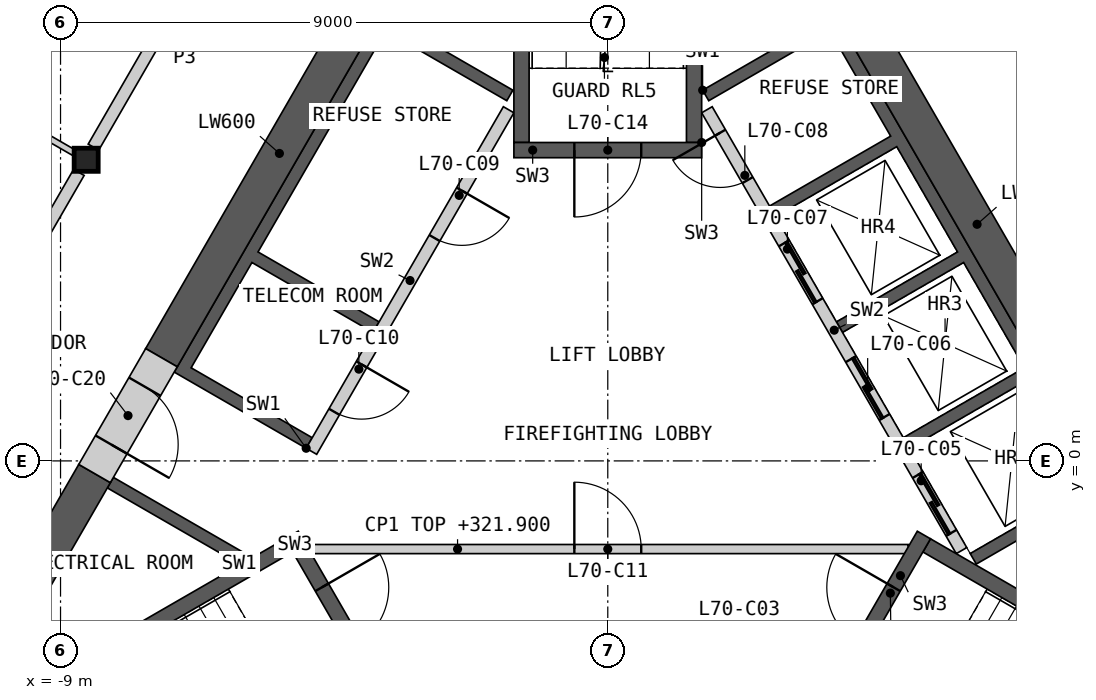
"""IFC4 building model, lengths in metres.
Left out: names, types, materials, properties, quantities, classifications, styles, units other than length and angle.
Written with IfcOpenShell. Run it as: python <this file> out.ifc"""

import sys

from ifc_helpers import new_model, si_unit, direction, frame, frame_2d, origin, origin_2d, place, context, subcontext, project, spatial, polyline, rectangle, i_section, outline, extrude, element, fill, save


model = new_model("IFC4")
c1 = context("Model", 3, precision=1e-05, world=origin(), true_north=direction((0.0, 1.0)))
c2 = subcontext(c1, "Body", "Model", "MODEL_VIEW")
j1 = project(units=[si_unit("LENGTHUNIT", "METRE"), si_unit("PLANEANGLEUNIT", "RADIAN")], contexts=[c1])
p1 = place(None, origin())
s1 = spatial("IfcSite", under=j1, at=p1, CompositionType="ELEMENT")
p2 = place(p1, origin())
s2 = spatial("IfcBuilding", under=s1, at=p2, CompositionType="ELEMENT")
p3 = place(p2, frame((0.0, 0.0, 318.8)))
s3 = spatial("IfcBuildingStorey", under=s2, at=p3, CompositionType="ELEMENT", Elevation=318.8)
p4 = place(p3, frame((-8.578, 4.953, 0.0), z_axis=(0.0, 0.0, 1.0), x_axis=(1.0, 0.0, 0.0)))
e1 = element("IfcColumn", 1, at=p4, inside=s3, PredefinedType="COLUMN", context=c2, shape_type="SweptSolid", body=[
    extrude(i_section(OverallWidth=0.396, OverallDepth=0.381, WebThickness=0.019, FlangeThickness=0.03, at=origin_2d()), origin(), (0.0, 0.0, 1.0), 3.4),
])
p5 = place(p3, origin())
e2 = element("IfcWall", 2, at=p5, inside=s3, PredefinedType="SHEAR", context=c2, shape_type="SweptSolid", body=[
    extrude(outline(polyline([(1.561, 6.097), (3.731, 7.35), (8.231, -0.444), (6.061, -1.697), (5.96, -1.524), (7.952, -0.374), (6.952, 1.358), (4.96, 0.208), (4.861, 0.381), (6.852, 1.531), (5.852, 3.263), (3.861, 2.113), (3.76, 2.287), (5.752, 3.437), (4.752, 5.169), (2.76, 4.019), (2.66, 4.192), (4.652, 5.342), (3.652, 7.074), (1.66, 5.924), (1.561, 6.097)])), origin(), (0.0, 0.0, 1.0), 3.1),
])
p6 = place(p3, frame((5.817, -1.476, 0.0), z_axis=(0.0, 0.0, 1.0), x_axis=(-0.500002616675, 0.866023893041, 0.0)))
e3 = element("IfcWall", 3, at=p6, inside=s3, PredefinedType="SOLIDWALL", context=c2, shape_type="SweptSolid", body=[
    extrude(rectangle(XDim=8.373, YDim=0.2, at=frame_2d((4.187, 0.0))), origin(), (0.0, 0.0, 1.0), 3.1),
])
p7 = place(p6, frame((0.337, 0.0, 0.0)))
e4 = element("IfcOpeningElement", 4, at=p7, cuts=e3, PredefinedType="OPENING", context=c2, shape_type="SweptSolid", body=[
    extrude(rectangle(XDim=1.1, YDim=2.1, at=frame_2d((0.55, 1.05))), frame((0.0, 0.11, 0.0), z_axis=(0.0, -1.0, 0.0), x_axis=(1.0, 0.0, 0.0)), (0.0, 0.0, 1.0), 0.22),
])
p8 = place(p6, frame((2.537, 0.0, 0.0)))
e5 = element("IfcOpeningElement", 5, at=p8, cuts=e3, PredefinedType="OPENING", context=c2, shape_type="SweptSolid", body=[
    extrude(rectangle(XDim=1.1, YDim=2.1, at=frame_2d((0.55, 1.05))), frame((0.0, 0.11, 0.0), z_axis=(0.0, -1.0, 0.0), x_axis=(1.0, 0.0, 0.0)), (0.0, 0.0, 1.0), 0.22),
])
p9 = place(p6, frame((4.737, 0.0, 0.0)))
e6 = element("IfcOpeningElement", 6, at=p9, cuts=e3, PredefinedType="OPENING", context=c2, shape_type="SweptSolid", body=[
    extrude(rectangle(XDim=1.1, YDim=2.1, at=frame_2d((0.55, 1.05))), frame((0.0, 0.11, 0.0), z_axis=(0.0, -1.0, 0.0), x_axis=(1.0, 0.0, 0.0)), (0.0, 0.0, 1.0), 0.22),
])
p10 = place(p6, frame((7.037, 0.0, 0.0)))
e7 = element("IfcOpeningElement", 7, at=p10, cuts=e3, PredefinedType="OPENING", context=c2, shape_type="SweptSolid", body=[
    extrude(rectangle(XDim=0.9, YDim=2.1, at=frame_2d((0.45, 1.05))), frame((0.0, 0.11, 0.0), z_axis=(0.0, -1.0, 0.0), x_axis=(1.0, 0.0, 0.0)), (0.0, 0.0, 1.0), 0.22),
])
p11 = place(p3, origin())
e8 = element("IfcWall", 8, at=p11, inside=s3, PredefinedType="SHEAR", context=c2, shape_type="SweptSolid", body=[
    extrude(outline(polyline([(-6.061, -1.697), (-8.231, -0.444), (-8.131, -0.271), (-5.96, -1.524), (-6.061, -1.697)])), origin(), (0.0, 0.0, 1.0), 3.1),
])
p12 = place(p3, origin())
e9 = element("IfcWall", 9, at=p12, inside=s3, PredefinedType="SHEAR", context=c2, shape_type="SweptSolid", body=[
    extrude(outline(polyline([(-4.96, 0.208), (-7.131, 1.461), (-3.731, 7.35), (-1.561, 6.097), (-1.66, 5.924), (-3.652, 7.074), (-5.752, 3.437), (-3.76, 2.287), (-3.861, 2.113), (-5.852, 3.263), (-6.852, 1.531), (-4.861, 0.381), (-4.96, 0.208)])), origin(), (0.0, 0.0, 1.0), 3.1),
])
p13 = place(p3, frame((-1.631, 5.776, 0.0), z_axis=(0.0, 0.0, 1.0), x_axis=(-0.499992876559, -0.866029516466, 0.0)))
e10 = element("IfcWall", 10, at=p13, inside=s3, PredefinedType="SOLIDWALL", context=c2, shape_type="SweptSolid", body=[
    extrude(rectangle(XDim=6.486, YDim=0.2, at=frame_2d((3.243, 0.0))), origin(), (0.0, 0.0, 1.0), 3.1),
])
p14 = place(p13, frame((1.537, 0.0, 0.0)))
e11 = element("IfcOpeningElement", 11, at=p14, cuts=e10, PredefinedType="OPENING", context=c2, shape_type="SweptSolid", body=[
    extrude(rectangle(XDim=0.9, YDim=2.1, at=frame_2d((0.45, 1.05))), frame((0.0, 0.11, 0.0), z_axis=(0.0, -1.0, 0.0), x_axis=(1.0, 0.0, 0.0)), (0.0, 0.0, 1.0), 0.22),
])
p15 = place(p13, frame((4.837, 0.0, 0.0)))
e12 = element("IfcOpeningElement", 12, at=p15, cuts=e10, PredefinedType="OPENING", context=c2, shape_type="SweptSolid", body=[
    extrude(rectangle(XDim=0.9, YDim=2.1, at=frame_2d((0.45, 1.05))), frame((0.0, 0.11, 0.0), z_axis=(0.0, -1.0, 0.0), x_axis=(1.0, 0.0, 0.0)), (0.0, 0.0, 1.0), 0.22),
])
p16 = place(p3, frame((-4.941, -1.45, 0.0), z_axis=(0.0, 0.0, 1.0), x_axis=(1.0, 0.0, 0.0)))
e13 = element("IfcWall", 13, at=p16, inside=s3, PredefinedType="PARTITIONING", context=c2, shape_type="SweptSolid", body=[
    extrude(rectangle(XDim=9.882, YDim=0.15, at=frame_2d((4.941, 0.0))), origin(), (0.0, 0.0, 1.0), 3.1),
])
p17 = place(p16, frame((4.391, 0.0, 0.0)))
e14 = element("IfcOpeningElement", 14, at=p17, cuts=e13, PredefinedType="OPENING", context=c2, shape_type="SweptSolid", body=[
    extrude(rectangle(XDim=1.1, YDim=2.1, at=frame_2d((0.55, 1.05))), frame((0.0, 0.085, 0.0), z_axis=(0.0, -1.0, 0.0), x_axis=(1.0, 0.0, 0.0)), (0.0, 0.0, 1.0), 0.17),
])
p18 = place(p3, origin())
e15 = element("IfcWall", 15, at=p18, inside=s3, PredefinedType="SHEAR", context=c2, shape_type="SweptSolid", body=[
    extrude(outline(polyline([(-5.307, -1.281), (-10.374, -4.206), (-10.032, -4.298), (-5.182, -1.498), (-5.307, -1.281)])), origin(), (0.0, 0.0, 1.0), 3.1),
])
p19 = place(p3, frame((-5.199, -1.219, 0.0), z_axis=(0.0, 0.0, 1.0), x_axis=(0.499982516597, -0.866035497597, 0.0)))
e16 = element("IfcWall", 16, at=p19, inside=s3, PredefinedType="SHEAR", context=c2, shape_type="SweptSolid", body=[
    extrude(rectangle(XDim=3.088, YDim=0.25, at=frame_2d((1.544, 0.0))), origin(), (0.0, 0.0, 1.0), 3.1),
])
p20 = place(p19, frame((0.994, 0.0, 0.0)))
e17 = element("IfcOpeningElement", 17, at=p20, cuts=e16, PredefinedType="OPENING", context=c2, shape_type="SweptSolid", body=[
    extrude(rectangle(XDim=1.1, YDim=2.1, at=frame_2d((0.55, 1.05))), frame((0.0, 0.135, 0.0), z_axis=(0.0, -1.0, 0.0), x_axis=(1.0, 0.0, 0.0)), (0.0, 0.0, 1.0), 0.27),
])
p21 = place(p3, origin())
e18 = element("IfcWall", 18, at=p21, inside=s3, PredefinedType="SHEAR", context=c2, shape_type="SweptSolid", body=[
    extrude(outline(polyline([(10.032, -4.298), (10.374, -4.206), (5.307, -1.281), (5.182, -1.498), (10.032, -4.298)])), origin(), (0.0, 0.0, 1.0), 3.1),
])
p22 = place(p3, frame((3.655, -3.893, 0.0), z_axis=(0.0, 0.0, 1.0), x_axis=(0.499982516597, 0.866035497597, 0.0)))
e19 = element("IfcWall", 19, at=p22, inside=s3, PredefinedType="SHEAR", context=c2, shape_type="SweptSolid", body=[
    extrude(rectangle(XDim=3.088, YDim=0.25, at=frame_2d((1.544, 0.0))), origin(), (0.0, 0.0, 1.0), 3.1),
])
p23 = place(p22, frame((0.994, 0.0, 0.0)))
e20 = element("IfcOpeningElement", 20, at=p23, cuts=e19, PredefinedType="OPENING", context=c2, shape_type="SweptSolid", body=[
    extrude(rectangle(XDim=1.1, YDim=2.1, at=frame_2d((0.55, 1.05))), frame((0.0, 0.135, 0.0), z_axis=(0.0, -1.0, 0.0), x_axis=(1.0, 0.0, 0.0)), (0.0, 0.0, 1.0), 0.27),
])
p24 = place(p3, origin())
e21 = element("IfcWall", 21, at=p24, inside=s3, PredefinedType="SHEAR", context=c2, shape_type="SweptSolid", body=[
    extrude(outline(polyline([(1.544, 5.237), (1.544, 11.087), (1.294, 10.837), (1.294, 5.237), (1.544, 5.237)])), origin(), (0.0, 0.0, 1.0), 3.1),
])
p25 = place(p3, origin())
e22 = element("IfcWall", 22, at=p25, inside=s3, PredefinedType="SHEAR", context=c2, shape_type="SweptSolid", body=[
    extrude(outline(polyline([(-1.294, 10.837), (-1.544, 11.087), (-1.544, 5.237), (-1.294, 5.237), (-1.294, 10.837)])), origin(), (0.0, 0.0, 1.0), 3.1),
])
p26 = place(p3, frame((1.544, 5.112, 0.0), z_axis=(0.0, 0.0, 1.0), x_axis=(-1.0, 0.0, 0.0)))
e23 = element("IfcWall", 23, at=p26, inside=s3, PredefinedType="SHEAR", context=c2, shape_type="SweptSolid", body=[
    extrude(rectangle(XDim=3.088, YDim=0.25, at=frame_2d((1.544, 0.0))), origin(), (0.0, 0.0, 1.0), 3.1),
])
p27 = place(p26, frame((0.994, 0.0, 0.0)))
e24 = element("IfcOpeningElement", 24, at=p27, cuts=e23, PredefinedType="OPENING", context=c2, shape_type="SweptSolid", body=[
    extrude(rectangle(XDim=1.1, YDim=2.1, at=frame_2d((0.55, 1.05))), frame((0.0, 0.135, 0.0), z_axis=(0.0, -1.0, 0.0), x_axis=(1.0, 0.0, 0.0)), (0.0, 0.0, 1.0), 0.27),
])
p28 = place(p3, frame((8.686, -0.634, 0.0), z_axis=(0.0, 0.0, 1.0), x_axis=(-0.50001836461, 0.866014800712, 0.0)))
e25 = element("IfcWall", 25, at=p28, inside=s3, PredefinedType="SHEAR", context=c2, shape_type="SweptSolid", body=[
    extrude(rectangle(XDim=10.451, YDim=0.6, at=frame_2d((5.225, 0.0))), origin(), (0.0, 0.0, 1.0), 3.1),
])
p29 = place(p3, frame((-3.461, 8.417, 0.0), z_axis=(0.0, 0.0, 1.0), x_axis=(-0.50000391502, -0.866023143435, 0.0)))
e26 = element("IfcWall", 26, at=p29, inside=s3, PredefinedType="SHEAR", context=c2, shape_type="SweptSolid", body=[
    extrude(rectangle(XDim=7.759, YDim=0.6, at=frame_2d((3.879, 0.0))), origin(), (0.0, 0.0, 1.0), 3.1),
])
p30 = place(p3, frame((-8.44, -0.208, 0.0), z_axis=(0.0, 0.0, 1.0), x_axis=(-0.500007425856, -0.866021116422, 0.0)))
e27 = element("IfcWall", 27, at=p30, inside=s3, PredefinedType="SHEAR", context=c2, shape_type="SweptSolid", body=[
    extrude(rectangle(XDim=4.969, YDim=0.6, at=frame_2d((2.484, 0.0))), origin(), (0.0, 0.0, 1.0), 3.1),
])
p31 = place(p3, frame((-7.34, 1.698, 0.0), z_axis=(0.0, 0.0, 1.0), x_axis=(-0.50002983664, -0.866008176907, 0.0)))
e28 = element("IfcWall", 28, at=p31, inside=s3, PredefinedType="SHEAR", context=c2, shape_type="SweptSolid", body=[
    extrude(rectangle(XDim=2.2, YDim=0.6, at=frame_2d((1.1, 0.0))), origin(), (0.0, 0.0, 1.0), 3.1),
])
p32 = place(p31, frame((0.55, 0.0, 0.0)))
e29 = element("IfcOpeningElement", 29, at=p32, cuts=e28, PredefinedType="OPENING", context=c2, shape_type="SweptSolid", body=[
    extrude(rectangle(XDim=1.1, YDim=2.1, at=frame_2d((0.55, 1.05))), frame((0.0, 0.31, 0.0), z_axis=(0.0, -1.0, 0.0), x_axis=(1.0, 0.0, 0.0)), (0.0, 0.0, 1.0), 0.62),
])
p33 = place(p3, frame((-8.458, 5.16, 0.0), z_axis=(0.0, 0.0, 1.0), x_axis=(0.499984266882, 0.866034487114, 0.0)))
e30 = element("IfcWall", 30, at=p33, inside=s3, PredefinedType="PARTITIONING", context=c2, shape_type="SweptSolid", body=[
    extrude(rectangle(XDim=8.099, YDim=0.2, at=frame_2d((4.049, 0.0))), origin(), (0.0, 0.0, 1.0), 3.1),
])
p34 = place(p33, frame((3.093, 0.0, 0.0)))
e31 = element("IfcOpeningElement", 31, at=p34, cuts=e30, PredefinedType="OPENING", context=c2, shape_type="SweptSolid", body=[
    extrude(rectangle(XDim=1.0, YDim=2.1, at=frame_2d((0.5, 1.05))), frame((0.0, 0.11, 0.0), z_axis=(0.0, -1.0, 0.0), x_axis=(1.0, 0.0, 0.0)), (0.0, 0.0, 1.0), 0.22),
])
p35 = place(p3, frame((-12.748, -2.269, 0.0), z_axis=(0.0, 0.0, 1.0), x_axis=(0.499984266882, 0.866034487114, 0.0)))
e32 = element("IfcWall", 32, at=p35, inside=s3, PredefinedType="PARTITIONING", context=c2, shape_type="SweptSolid", body=[
    extrude(rectangle(XDim=8.099, YDim=0.2, at=frame_2d((4.049, 0.0))), origin(), (0.0, 0.0, 1.0), 3.1),
])
p36 = place(p35, frame((1.164, 0.0, 0.0)))
e33 = element("IfcOpeningElement", 33, at=p36, cuts=e32, PredefinedType="OPENING", context=c2, shape_type="SweptSolid", body=[
    extrude(rectangle(XDim=1.0, YDim=2.1, at=frame_2d((0.5, 1.05))), frame((0.0, 0.11, 0.0), z_axis=(0.0, -1.0, 0.0), x_axis=(1.0, 0.0, 0.0)), (0.0, 0.0, 1.0), 0.22),
])
p37 = place(p3, frame((4.409, 12.174, 0.0), z_axis=(0.0, 0.0, 1.0), x_axis=(0.499984266882, -0.866034487114, 0.0)))
e34 = element("IfcWall", 34, at=p37, inside=s3, PredefinedType="PARTITIONING", context=c2, shape_type="SweptSolid", body=[
    extrude(rectangle(XDim=8.099, YDim=0.2, at=frame_2d((4.049, 0.0))), origin(), (0.0, 0.0, 1.0), 3.1),
])
p38 = place(p37, frame((3.905, 0.0, 0.0)))
e35 = element("IfcOpeningElement", 35, at=p38, cuts=e34, PredefinedType="OPENING", context=c2, shape_type="SweptSolid", body=[
    extrude(rectangle(XDim=1.0, YDim=2.1, at=frame_2d((0.5, 1.05))), frame((0.0, 0.11, 0.0), z_axis=(0.0, -1.0, 0.0), x_axis=(1.0, 0.0, 0.0)), (0.0, 0.0, 1.0), 0.22),
])
p39 = place(p3, frame((6.74, 15.739, 0.0), z_axis=(0.0, 0.0, 1.0), x_axis=(0.499995022685, -0.86602827742, 0.0)))
e36 = element("IfcWall", 36, at=p39, inside=s3, PredefinedType="PARTITIONING", context=c2, shape_type="SweptSolid", body=[
    extrude(rectangle(XDim=15.404, YDim=0.1, at=frame_2d((7.702, 0.0))), origin(), (0.0, 0.0, 1.0), 2.33),
])
p40 = place(p39, frame((8.582, 0.0, 0.0)))
e37 = element("IfcOpeningElement", 37, at=p40, cuts=e36, PredefinedType="OPENING", context=c2, shape_type="SweptSolid", body=[
    extrude(rectangle(XDim=0.95, YDim=2.1, at=frame_2d((0.475, 1.05))), frame((0.0, 0.06, 0.0), z_axis=(0.0, -1.0, 0.0), x_axis=(1.0, 0.0, 0.0)), (0.0, 0.0, 1.0), 0.12),
])
p41 = place(p3, frame((6.504, 12.572, 0.0), z_axis=(0.0, 0.0, 1.0), x_axis=(0.499998094172, -0.866026504112, 0.0)))
e38 = element("IfcWall", 38, at=p41, inside=s3, PredefinedType="PARTITIONING", context=c2, shape_type="SweptSolid", body=[
    extrude(rectangle(XDim=12.778, YDim=0.1, at=frame_2d((6.389, 0.0))), origin(), (0.0, 0.0, 1.0), 2.33),
])
p42 = place(p41, frame((3.759, 0.0, 0.0)))
e39 = element("IfcOpeningElement", 39, at=p42, cuts=e38, PredefinedType="OPENING", context=c2, shape_type="SweptSolid", body=[
    extrude(rectangle(XDim=0.95, YDim=2.1, at=frame_2d((0.475, 1.05))), frame((0.0, 0.06, 0.0), z_axis=(0.0, -1.0, 0.0), x_axis=(1.0, 0.0, 0.0)), (0.0, 0.0, 1.0), 0.12),
])
p43 = place(p3, frame((-13.386, 7.729, 0.0), z_axis=(0.0, 0.0, 1.0), x_axis=(0.866034036823, -0.49998504684, 0.0)))
e40 = element("IfcWall", 40, at=p43, inside=s3, PredefinedType="PARTITIONING", context=c2, shape_type="SweptSolid", body=[
    extrude(rectangle(XDim=5.312, YDim=0.1, at=frame_2d((2.656, 0.0))), origin(), (0.0, 0.0, 1.0), 2.33),
])
p44 = place(p7, origin())
e41 = element("IfcDoor", 41, at=p44, inside=s3, OperationType="SLIDING_TO_LEFT", PredefinedType="DOOR", context=c2, shape_type="SweptSolid", body=[
    extrude(rectangle(XDim=1.1, YDim=2.1, at=frame_2d((0.55, 1.05))), frame((0.0, 0.025, 0.0), z_axis=(0.0, -1.0, 0.0), x_axis=(1.0, 0.0, 0.0)), (0.0, 0.0, 1.0), 0.05),
])
fill(e4, e41)
p45 = place(p8, origin())
e42 = element("IfcDoor", 42, at=p45, inside=s3, OperationType="SLIDING_TO_LEFT", PredefinedType="DOOR", context=c2, shape_type="SweptSolid", body=[
    extrude(rectangle(XDim=1.1, YDim=2.1, at=frame_2d((0.55, 1.05))), frame((0.0, 0.025, 0.0), z_axis=(0.0, -1.0, 0.0), x_axis=(1.0, 0.0, 0.0)), (0.0, 0.0, 1.0), 0.05),
])
fill(e5, e42)
p46 = place(p9, origin())
e43 = element("IfcDoor", 43, at=p46, inside=s3, OperationType="SLIDING_TO_LEFT", PredefinedType="DOOR", context=c2, shape_type="SweptSolid", body=[
    extrude(rectangle(XDim=1.1, YDim=2.1, at=frame_2d((0.55, 1.05))), frame((0.0, 0.025, 0.0), z_axis=(0.0, -1.0, 0.0), x_axis=(1.0, 0.0, 0.0)), (0.0, 0.0, 1.0), 0.05),
])
fill(e6, e43)
p47 = place(p10, origin())
e44 = element("IfcDoor", 44, at=p47, inside=s3, OperationType="SINGLE_SWING_RIGHT", PredefinedType="DOOR", context=c2, shape_type="SweptSolid", body=[
    extrude(rectangle(XDim=0.9, YDim=2.1, at=frame_2d((0.45, 1.05))), frame((0.0, 0.025, 0.0), z_axis=(0.0, -1.0, 0.0), x_axis=(1.0, 0.0, 0.0)), (0.0, 0.0, 1.0), 0.05),
])
fill(e7, e44)
p48 = place(p14, origin())
e45 = element("IfcDoor", 45, at=p48, inside=s3, OperationType="SINGLE_SWING_LEFT", PredefinedType="DOOR", context=c2, shape_type="SweptSolid", body=[
    extrude(rectangle(XDim=0.9, YDim=2.1, at=frame_2d((0.45, 1.05))), frame((0.0, 0.025, 0.0), z_axis=(0.0, -1.0, 0.0), x_axis=(1.0, 0.0, 0.0)), (0.0, 0.0, 1.0), 0.05),
])
fill(e11, e45)
p49 = place(p15, origin())
e46 = element("IfcDoor", 46, at=p49, inside=s3, OperationType="SINGLE_SWING_LEFT", PredefinedType="DOOR", context=c2, shape_type="SweptSolid", body=[
    extrude(rectangle(XDim=0.9, YDim=2.1, at=frame_2d((0.45, 1.05))), frame((0.0, 0.025, 0.0), z_axis=(0.0, -1.0, 0.0), x_axis=(1.0, 0.0, 0.0)), (0.0, 0.0, 1.0), 0.05),
])
fill(e12, e46)
p50 = place(p17, origin())
e47 = element("IfcDoor", 47, at=p50, inside=s3, OperationType="SINGLE_SWING_LEFT", PredefinedType="DOOR", context=c2, shape_type="SweptSolid", body=[
    extrude(rectangle(XDim=1.1, YDim=2.1, at=frame_2d((0.55, 1.05))), frame((0.0, 0.025, 0.0), z_axis=(0.0, -1.0, 0.0), x_axis=(1.0, 0.0, 0.0)), (0.0, 0.0, 1.0), 0.05),
])
fill(e14, e47)
p51 = place(p20, origin())
e48 = element("IfcDoor", 48, at=p51, inside=s3, OperationType="SINGLE_SWING_LEFT", PredefinedType="DOOR", context=c2, shape_type="SweptSolid", body=[
    extrude(rectangle(XDim=1.1, YDim=2.1, at=frame_2d((0.55, 1.05))), frame((0.0, 0.025, 0.0), z_axis=(0.0, -1.0, 0.0), x_axis=(1.0, 0.0, 0.0)), (0.0, 0.0, 1.0), 0.05),
])
fill(e17, e48)
p52 = place(p23, origin())
e49 = element("IfcDoor", 49, at=p52, inside=s3, OperationType="SINGLE_SWING_RIGHT", PredefinedType="DOOR", context=c2, shape_type="SweptSolid", body=[
    extrude(rectangle(XDim=1.1, YDim=2.1, at=frame_2d((0.55, 1.05))), frame((0.0, 0.025, 0.0), z_axis=(0.0, -1.0, 0.0), x_axis=(1.0, 0.0, 0.0)), (0.0, 0.0, 1.0), 0.05),
])
fill(e20, e49)
p53 = place(p27, origin())
e50 = element("IfcDoor", 50, at=p53, inside=s3, OperationType="SINGLE_SWING_RIGHT", PredefinedType="DOOR", context=c2, shape_type="SweptSolid", body=[
    extrude(rectangle(XDim=1.1, YDim=2.1, at=frame_2d((0.55, 1.05))), frame((0.0, 0.025, 0.0), z_axis=(0.0, -1.0, 0.0), x_axis=(1.0, 0.0, 0.0)), (0.0, 0.0, 1.0), 0.05),
])
fill(e24, e50)
p54 = place(p32, origin())
e51 = element("IfcDoor", 51, at=p54, inside=s3, OperationType="SINGLE_SWING_RIGHT", PredefinedType="DOOR", context=c2, shape_type="SweptSolid", body=[
    extrude(rectangle(XDim=1.1, YDim=2.1, at=frame_2d((0.55, 1.05))), frame((0.0, 0.055, 0.0), z_axis=(0.0, -1.0, 0.0), x_axis=(1.0, 0.0, 0.0)), (0.0, 0.0, 1.0), 0.05),
])
fill(e29, e51)
save(model, sys.argv[1])
